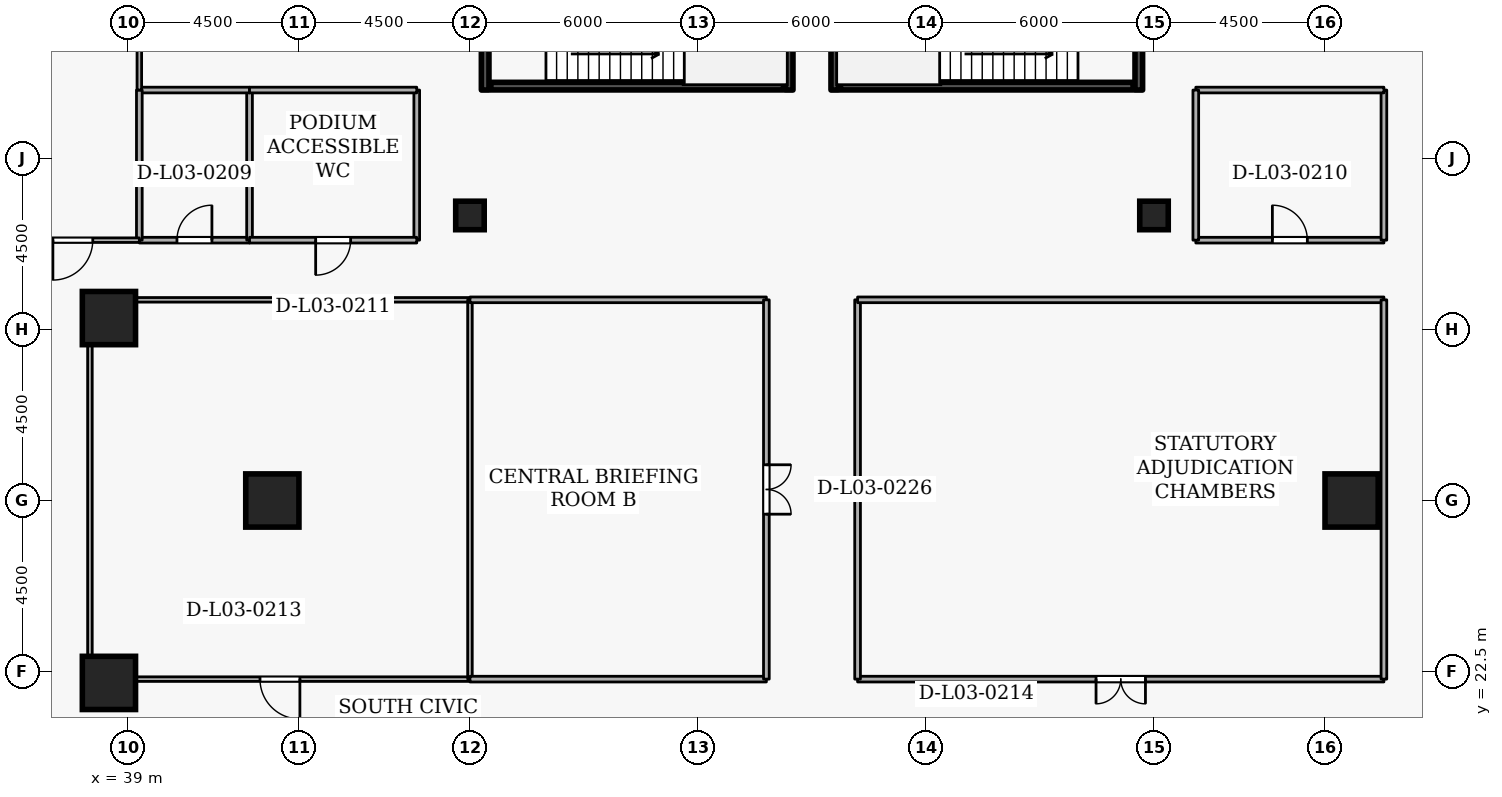
"""IFC4 building model, lengths in metres.
Left out: names, types, materials, properties, quantities, classifications, styles, units other than length and angle.
Written with IfcOpenShell. Run it as: python <this file> out.ifc"""

import sys

from ifc_helpers import new_model, si_unit, direction, frame, frame_2d, origin, origin_2d, place, context, subcontext, project, spatial, rectangle, extrude, element, fill, save


model = new_model("IFC4")
c1 = context("Model", 3, precision=1e-05, world=origin(), true_north=direction((0.0, 1.0)))
c2 = subcontext(c1, "Body", "Model", "MODEL_VIEW")
j1 = project(units=[si_unit("LENGTHUNIT", "METRE"), si_unit("PLANEANGLEUNIT", "RADIAN")], contexts=[c1])
p1 = place(None, origin())
s1 = spatial("IfcSite", under=j1, at=p1, CompositionType="ELEMENT")
p2 = place(p1, origin())
s2 = spatial("IfcBuilding", under=s1, at=p2, CompositionType="ELEMENT")
p3 = place(p2, frame((0.0, 0.0, 14.1)))
s3 = spatial("IfcBuildingStorey", under=s2, at=p3, CompositionType="ELEMENT", Elevation=14.1)
for number, where, z_axis, x_axis in (
    (1, (42.8, 27.0, 0.0), (0.0, 0.0, 1.0), (1.0, 0.0, 0.0)),
    (2, (38.5, 22.2, 0.0), (0.0, 0.0, 1.0), (1.0, 0.0, 0.0)),
    (3, (38.5, 31.8, 0.0), (0.0, 0.0, 1.0), (1.0, 0.0, 0.0)),
    (4, (71.2, 27.0, 0.0), (0.0, 0.0, 1.0), (1.0, 0.0, 0.0)),
):
    element("IfcColumn", number, at=place(p3, frame(where, z_axis=z_axis, x_axis=x_axis)), inside=s3, PredefinedType="COLUMN", context=c2, shape_type="SweptSolid", body=[
        extrude(rectangle(XDim=1.4, YDim=1.4, at=origin_2d()), origin(), (0.0, 0.0, 1.0), 4.5),
    ])
for number, where, z_axis, x_axis in (
    (5, (48.0, 34.5, 0.0), (0.0, 0.0, 1.0), (1.0, 0.0, 0.0)),
    (6, (66.0, 34.5, 0.0), (0.0, 0.0, 1.0), (1.0, 0.0, 0.0)),
):
    element("IfcColumn", number, at=place(p3, frame(where, z_axis=z_axis, x_axis=x_axis)), inside=s3, PredefinedType="COLUMN", context=c2, shape_type="SweptSolid", body=[
        extrude(rectangle(XDim=0.75, YDim=0.75, at=origin_2d()), origin(), (0.0, 0.0, 1.0), 4.5),
    ])
p4 = place(p3, frame((48.4, 37.8, 0.0), z_axis=(0.0, 0.0, 1.0), x_axis=(0.0, 1.0, 0.0)))
e7 = element("IfcWall", 7, at=p4, inside=s3, PredefinedType="SHEAR", context=c2, shape_type="SweptSolid", body=[
    extrude(rectangle(XDim=3.6, YDim=0.2, at=frame_2d((1.8, 0.0))), origin(), (0.0, 0.0, 1.0), 4.5),
])
p5 = place(p4, frame((1.25, 0.0, 0.0)))
e8 = element("IfcOpeningElement", 8, at=p5, cuts=e7, PredefinedType="OPENING", context=c2, shape_type="SweptSolid", body=[
    extrude(rectangle(XDim=1.1, YDim=2.1, at=frame_2d((0.55, 1.05))), frame((0.0, 0.11, 0.0), z_axis=(0.0, -1.0, 0.0), x_axis=(1.0, 0.0, 0.0)), (0.0, 0.0, 1.0), 0.22),
])
p6 = place(p3, frame((56.4, 41.4, 0.0), z_axis=(0.0, 0.0, 1.0), x_axis=(0.0, -1.0, 0.0)))
e9 = element("IfcWall", 9, at=p6, inside=s3, PredefinedType="SHEAR", context=c2, shape_type="SweptSolid", body=[
    extrude(rectangle(XDim=3.6, YDim=0.2, at=frame_2d((1.8, 0.0))), origin(), (0.0, 0.0, 1.0), 4.5),
])
p7 = place(p3, frame((48.55, 37.903, 0.0), z_axis=(0.0, 0.0, 1.0), x_axis=(1.0, 0.0, 0.0)))
e10 = element("IfcWall", 10, at=p7, inside=s3, PredefinedType="SHEAR", context=c2, shape_type="SweptSolid", body=[
    extrude(rectangle(XDim=7.7, YDim=0.2, at=frame_2d((3.85, 0.0))), origin(), (0.0, 0.0, 1.0), 4.5),
])
p8 = place(p3, frame((65.6, 41.4, 0.0), z_axis=(0.0, 0.0, 1.0), x_axis=(0.0, -1.0, 0.0)))
e11 = element("IfcWall", 11, at=p8, inside=s3, PredefinedType="SHEAR", context=c2, shape_type="SweptSolid", body=[
    extrude(rectangle(XDim=3.6, YDim=0.2, at=frame_2d((1.8, 0.0))), origin(), (0.0, 0.0, 1.0), 4.5),
])
p9 = place(p8, frame((1.25, 0.0, 0.0)))
e12 = element("IfcOpeningElement", 12, at=p9, cuts=e11, PredefinedType="OPENING", context=c2, shape_type="SweptSolid", body=[
    extrude(rectangle(XDim=1.1, YDim=2.1, at=frame_2d((0.55, 1.05))), frame((0.0, 0.11, 0.0), z_axis=(0.0, -1.0, 0.0), x_axis=(1.0, 0.0, 0.0)), (0.0, 0.0, 1.0), 0.22),
])
p10 = place(p3, frame((57.6, 37.8, 0.0), z_axis=(0.0, 0.0, 1.0), x_axis=(0.0, 1.0, 0.0)))
e13 = element("IfcWall", 13, at=p10, inside=s3, PredefinedType="SHEAR", context=c2, shape_type="SweptSolid", body=[
    extrude(rectangle(XDim=3.6, YDim=0.2, at=frame_2d((1.8, 0.0))), origin(), (0.0, 0.0, 1.0), 4.5),
])
p11 = place(p3, frame((57.75, 37.903, 0.0), z_axis=(0.0, 0.0, 1.0), x_axis=(1.0, 0.0, 0.0)))
e14 = element("IfcWall", 14, at=p11, inside=s3, PredefinedType="SHEAR", context=c2, shape_type="SweptSolid", body=[
    extrude(rectangle(XDim=7.7, YDim=0.2, at=frame_2d((3.85, 0.0))), origin(), (0.0, 0.0, 1.0), 4.5),
])
p12 = place(p3, frame((39.3, 33.85, 0.0), z_axis=(0.0, 0.0, 1.0), x_axis=(1.0, 0.0, 0.0)))
e15 = element("IfcWall", 15, at=p12, inside=s3, PredefinedType="PARTITIONING", context=c2, shape_type="SweptSolid", body=[
    extrude(rectangle(XDim=2.9, YDim=0.15, at=frame_2d((1.45, 0.0))), origin(), (0.0, 0.0, 1.0), 4.16),
])
p13 = place(p12, frame((0.99, 0.0, 0.0)))
e16 = element("IfcOpeningElement", 16, at=p13, cuts=e15, PredefinedType="OPENING", context=c2, shape_type="SweptSolid", body=[
    extrude(rectangle(XDim=0.92, YDim=2.08, at=frame_2d((0.46, 1.04))), frame((0.0, 0.085, 0.0), z_axis=(0.0, -1.0, 0.0), x_axis=(1.0, 0.0, 0.0)), (0.0, 0.0, 1.0), 0.17),
])
p14 = place(p3, frame((42.2, 33.85, 0.0), z_axis=(0.0, 0.0, 1.0), x_axis=(0.0, 1.0, 0.0)))
e17 = element("IfcWall", 17, at=p14, inside=s3, PredefinedType="PARTITIONING", context=c2, shape_type="SweptSolid", body=[
    extrude(rectangle(XDim=3.95, YDim=0.15, at=frame_2d((1.975, 0.0))), origin(), (0.0, 0.0, 1.0), 4.16),
])
p15 = place(p3, frame((42.2, 37.8, 0.0), z_axis=(0.0, 0.0, 1.0), x_axis=(-1.0, 0.0, 0.0)))
e18 = element("IfcWall", 18, at=p15, inside=s3, PredefinedType="PARTITIONING", context=c2, shape_type="SweptSolid", body=[
    extrude(rectangle(XDim=2.9, YDim=0.15, at=frame_2d((1.45, 0.0))), origin(), (0.0, 0.0, 1.0), 4.16),
])
p16 = place(p3, frame((39.3, 37.8, 0.0), z_axis=(0.0, 0.0, 1.0), x_axis=(0.0, -1.0, 0.0)))
e19 = element("IfcWall", 19, at=p16, inside=s3, PredefinedType="PARTITIONING", context=c2, shape_type="SweptSolid", body=[
    extrude(rectangle(XDim=3.95, YDim=0.15, at=frame_2d((1.975, 0.0))), origin(), (0.0, 0.0, 1.0), 4.16),
])
p17 = place(p3, frame((67.1, 33.85, 0.0), z_axis=(0.0, 0.0, 1.0), x_axis=(1.0, 0.0, 0.0)))
e20 = element("IfcWall", 20, at=p17, inside=s3, PredefinedType="PARTITIONING", context=c2, shape_type="SweptSolid", body=[
    extrude(rectangle(XDim=4.95, YDim=0.15, at=frame_2d((2.475, 0.0))), origin(), (0.0, 0.0, 1.0), 4.16),
])
p18 = place(p17, frame((2.015, 0.0, 0.0)))
e21 = element("IfcOpeningElement", 21, at=p18, cuts=e20, PredefinedType="OPENING", context=c2, shape_type="SweptSolid", body=[
    extrude(rectangle(XDim=0.92, YDim=2.08, at=frame_2d((0.46, 1.04))), frame((0.0, 0.085, 0.0), z_axis=(0.0, -1.0, 0.0), x_axis=(1.0, 0.0, 0.0)), (0.0, 0.0, 1.0), 0.17),
])
p19 = place(p3, frame((72.05, 33.85, 0.0), z_axis=(0.0, 0.0, 1.0), x_axis=(0.0, 1.0, 0.0)))
e22 = element("IfcWall", 22, at=p19, inside=s3, PredefinedType="PARTITIONING", context=c2, shape_type="SweptSolid", body=[
    extrude(rectangle(XDim=3.95, YDim=0.15, at=frame_2d((1.975, 0.0))), origin(), (0.0, 0.0, 1.0), 4.16),
])
p20 = place(p3, frame((72.05, 37.8, 0.0), z_axis=(0.0, 0.0, 1.0), x_axis=(-1.0, 0.0, 0.0)))
e23 = element("IfcWall", 23, at=p20, inside=s3, PredefinedType="PARTITIONING", context=c2, shape_type="SweptSolid", body=[
    extrude(rectangle(XDim=4.95, YDim=0.15, at=frame_2d((2.475, 0.0))), origin(), (0.0, 0.0, 1.0), 4.16),
])
for number, where, z_axis, x_axis in (
    (24, (67.1, 37.8, 0.0), (0.0, 0.0, 1.0), (0.0, -1.0, 0.0)),
    (25, (46.6, 37.8, 0.0), (0.0, 0.0, 1.0), (0.0, -1.0, 0.0)),
):
    element("IfcWall", number, at=place(p3, frame(where, z_axis=z_axis, x_axis=x_axis)), inside=s3, PredefinedType="PARTITIONING", context=c2, shape_type="SweptSolid", body=[
        extrude(rectangle(XDim=3.95, YDim=0.15, at=frame_2d((1.975, 0.0))), origin(), (0.0, 0.0, 1.0), 4.16),
    ])
p21 = place(p3, frame((46.6, 33.85, 0.0), z_axis=(0.0, 0.0, 1.0), x_axis=(-1.0, 0.0, 0.0)))
e26 = element("IfcWall", 26, at=p21, inside=s3, PredefinedType="PARTITIONING", context=c2, shape_type="SweptSolid", body=[
    extrude(rectangle(XDim=4.4, YDim=0.15, at=frame_2d((2.2, 0.0))), origin(), (0.0, 0.0, 1.0), 4.16),
])
p22 = place(p21, frame((1.74, 0.0, 0.0)))
e27 = element("IfcOpeningElement", 27, at=p22, cuts=e26, PredefinedType="OPENING", context=c2, shape_type="SweptSolid", body=[
    extrude(rectangle(XDim=0.92, YDim=2.08, at=frame_2d((0.46, 1.04))), frame((0.0, 0.085, 0.0), z_axis=(0.0, -1.0, 0.0), x_axis=(1.0, 0.0, 0.0)), (0.0, 0.0, 1.0), 0.17),
])
p23 = place(p3, frame((42.2, 37.8, 0.0), z_axis=(0.0, 0.0, 1.0), x_axis=(1.0, 0.0, 0.0)))
e28 = element("IfcWall", 28, at=p23, inside=s3, PredefinedType="PARTITIONING", context=c2, shape_type="SweptSolid", body=[
    extrude(rectangle(XDim=4.4, YDim=0.15, at=frame_2d((2.2, 0.0))), origin(), (0.0, 0.0, 1.0), 4.16),
])
p24 = place(p3, frame((48.0, 22.3, 0.0), z_axis=(0.0, 0.0, 1.0), x_axis=(-1.0, 0.0, 0.0)))
e29 = element("IfcWall", 29, at=p24, inside=s3, PredefinedType="PARTITIONING", context=c2, shape_type="SweptSolid", body=[
    extrude(rectangle(XDim=10.0, YDim=0.12, at=frame_2d((5.0, 0.0))), origin(), (0.0, 0.0, 1.0), 4.16),
])
p25 = place(p24, frame((4.475, 0.0, 0.0)))
e30 = element("IfcOpeningElement", 30, at=p25, cuts=e29, PredefinedType="OPENING", context=c2, shape_type="SweptSolid", body=[
    extrude(rectangle(XDim=1.05, YDim=2.1, at=frame_2d((0.525, 1.05))), frame((0.0, 0.07, 0.0), z_axis=(0.0, -1.0, 0.0), x_axis=(1.0, 0.0, 0.0)), (0.0, 0.0, 1.0), 0.14),
])
p26 = place(p3, frame((38.0, 22.3, 0.0), z_axis=(0.0, 0.0, 1.0), x_axis=(0.0, 1.0, 0.0)))
e31 = element("IfcWall", 31, at=p26, inside=s3, PredefinedType="PARTITIONING", context=c2, shape_type="SweptSolid", body=[
    extrude(rectangle(XDim=9.98, YDim=0.12, at=frame_2d((4.99, 0.0))), origin(), (0.0, 0.0, 1.0), 4.16),
])
p27 = place(p3, frame((38.0, 32.28, 0.0), z_axis=(0.0, 0.0, 1.0), x_axis=(1.0, 0.0, 0.0)))
e32 = element("IfcWall", 32, at=p27, inside=s3, PredefinedType="PARTITIONING", context=c2, shape_type="SweptSolid", body=[
    extrude(rectangle(XDim=10.0, YDim=0.12, at=frame_2d((5.0, 0.0))), origin(), (0.0, 0.0, 1.0), 4.16),
])
p28 = place(p3, frame((48.0, 32.28, 0.0), z_axis=(0.0, 0.0, 1.0), x_axis=(0.0, -1.0, 0.0)))
e33 = element("IfcWall", 33, at=p28, inside=s3, PredefinedType="PARTITIONING", context=c2, shape_type="SweptSolid", body=[
    extrude(rectangle(XDim=9.98, YDim=0.12, at=frame_2d((4.99, 0.0))), origin(), (0.0, 0.0, 1.0), 3.314),
])
p29 = place(p3, frame((72.05, 22.3, 0.0), z_axis=(0.0, 0.0, 1.0), x_axis=(-1.0, 0.0, 0.0)))
e34 = element("IfcWall", 34, at=p29, inside=s3, PredefinedType="PARTITIONING", context=c2, shape_type="SweptSolid", body=[
    extrude(rectangle(XDim=13.85, YDim=0.15, at=frame_2d((6.925, 0.0))), origin(), (0.0, 0.0, 1.0), 4.16),
])
p30 = place(p29, frame((6.275, 0.0, 0.0)))
e35 = element("IfcOpeningElement", 35, at=p30, cuts=e34, PredefinedType="OPENING", context=c2, shape_type="SweptSolid", body=[
    extrude(rectangle(XDim=1.3, YDim=2.12, at=frame_2d((0.65, 1.06))), frame((0.0, 0.085, 0.0), z_axis=(0.0, -1.0, 0.0), x_axis=(1.0, 0.0, 0.0)), (0.0, 0.0, 1.0), 0.17),
])
p31 = place(p3, frame((58.2, 22.3, 0.0), z_axis=(0.0, 0.0, 1.0), x_axis=(0.0, 1.0, 0.0)))
e36 = element("IfcWall", 36, at=p31, inside=s3, PredefinedType="PARTITIONING", context=c2, shape_type="SweptSolid", body=[
    extrude(rectangle(XDim=9.98, YDim=0.15, at=frame_2d((4.99, 0.0))), origin(), (0.0, 0.0, 1.0), 4.16),
])
p32 = place(p3, frame((58.2, 32.28, 0.0), z_axis=(0.0, 0.0, 1.0), x_axis=(1.0, 0.0, 0.0)))
e37 = element("IfcWall", 37, at=p32, inside=s3, PredefinedType="PARTITIONING", context=c2, shape_type="SweptSolid", body=[
    extrude(rectangle(XDim=13.85, YDim=0.15, at=frame_2d((6.925, 0.0))), origin(), (0.0, 0.0, 1.0), 4.16),
])
p33 = place(p3, frame((72.05, 32.28, 0.0), z_axis=(0.0, 0.0, 1.0), x_axis=(0.0, -1.0, 0.0)))
e38 = element("IfcWall", 38, at=p33, inside=s3, PredefinedType="PARTITIONING", context=c2, shape_type="SweptSolid", body=[
    extrude(rectangle(XDim=9.98, YDim=0.15, at=frame_2d((4.99, 0.0))), origin(), (0.0, 0.0, 1.0), 4.16),
])
p34 = place(p3, frame((39.3, 49.18, 0.0), z_axis=(0.0, 0.0, 1.0), x_axis=(0.0, -1.0, 0.0)))
e39 = element("IfcWall", 39, at=p34, inside=s3, PredefinedType="PARTITIONING", context=c2, shape_type="SweptSolid", body=[
    extrude(rectangle(XDim=11.38, YDim=0.12, at=frame_2d((5.69, 0.0))), origin(), (0.0, 0.0, 1.0), 4.16),
])
p35 = place(p3, frame((39.3, 33.85, 0.0), z_axis=(0.0, 0.0, 1.0), x_axis=(-1.0, 0.0, 0.0)))
e40 = element("IfcWall", 40, at=p35, inside=s3, PredefinedType="PARTITIONING", context=c2, shape_type="SweptSolid", body=[
    extrude(rectangle(XDim=3.5, YDim=0.12, at=frame_2d((1.75, 0.0))), origin(), (0.0, 0.0, 1.0), 4.16),
])
p36 = place(p35, frame((1.225, 0.0, 0.0)))
e41 = element("IfcOpeningElement", 41, at=p36, cuts=e40, PredefinedType="OPENING", context=c2, shape_type="SweptSolid", body=[
    extrude(rectangle(XDim=1.05, YDim=2.1, at=frame_2d((0.525, 1.05))), frame((0.0, 0.07, 0.0), z_axis=(0.0, -1.0, 0.0), x_axis=(1.0, 0.0, 0.0)), (0.0, 0.0, 1.0), 0.14),
])
for number, where, z_axis, x_axis in (
    (42, (55.8, 22.3, 0.0), (0.0, 0.0, 1.0), (-1.0, 0.0, 0.0)),
    (43, (48.0, 32.28, 0.0), (0.0, 0.0, 1.0), (1.0, 0.0, 0.0)),
):
    element("IfcWall", number, at=place(p3, frame(where, z_axis=z_axis, x_axis=x_axis)), inside=s3, PredefinedType="PARTITIONING", context=c2, shape_type="SweptSolid", body=[
        extrude(rectangle(XDim=7.8, YDim=0.15, at=frame_2d((3.9, 0.0))), origin(), (0.0, 0.0, 1.0), 4.16),
    ])
p37 = place(p3, frame((55.8, 32.28, 0.0), z_axis=(0.0, 0.0, 1.0), x_axis=(0.0, -1.0, 0.0)))
e44 = element("IfcWall", 44, at=p37, inside=s3, PredefinedType="PARTITIONING", context=c2, shape_type="SweptSolid", body=[
    extrude(rectangle(XDim=9.98, YDim=0.15, at=frame_2d((4.99, 0.0))), origin(), (0.0, 0.0, 1.0), 4.16),
])
p38 = place(p37, frame((4.34, 0.0, 0.0)))
e45 = element("IfcOpeningElement", 45, at=p38, cuts=e44, PredefinedType="OPENING", context=c2, shape_type="SweptSolid", body=[
    extrude(rectangle(XDim=1.3, YDim=2.12, at=frame_2d((0.65, 1.06))), frame((0.0, 0.085, 0.0), z_axis=(0.0, -1.0, 0.0), x_axis=(1.0, 0.0, 0.0)), (0.0, 0.0, 1.0), 0.17),
])
p39 = place(p13, origin())
e46 = element("IfcDoor", 46, at=p39, inside=s3, OperationType="SINGLE_SWING_RIGHT", PredefinedType="DOOR", context=c2, shape_type="SweptSolid", body=[
    extrude(rectangle(XDim=0.92, YDim=2.08, at=frame_2d((0.46, 1.04))), frame((0.0, 0.025, 0.0), z_axis=(0.0, -1.0, 0.0), x_axis=(1.0, 0.0, 0.0)), (0.0, 0.0, 1.0), 0.05),
])
fill(e16, e46)
p40 = place(p18, origin())
e47 = element("IfcDoor", 47, at=p40, inside=s3, OperationType="SINGLE_SWING_LEFT", PredefinedType="DOOR", context=c2, shape_type="SweptSolid", body=[
    extrude(rectangle(XDim=0.92, YDim=2.08, at=frame_2d((0.46, 1.04))), frame((0.0, 0.025, 0.0), z_axis=(0.0, -1.0, 0.0), x_axis=(1.0, 0.0, 0.0)), (0.0, 0.0, 1.0), 0.05),
])
fill(e21, e47)
p41 = place(p22, origin())
e48 = element("IfcDoor", 48, at=p41, inside=s3, OperationType="SINGLE_SWING_RIGHT", PredefinedType="DOOR", context=c2, shape_type="SweptSolid", body=[
    extrude(rectangle(XDim=0.92, YDim=2.08, at=frame_2d((0.46, 1.04))), frame((0.0, 0.025, 0.0), z_axis=(0.0, -1.0, 0.0), x_axis=(1.0, 0.0, 0.0)), (0.0, 0.0, 1.0), 0.05),
])
fill(e27, e48)
p42 = place(p25, origin())
e49 = element("IfcDoor", 49, at=p42, inside=s3, OperationType="SINGLE_SWING_LEFT", PredefinedType="DOOR", context=c2, shape_type="SweptSolid", body=[
    extrude(rectangle(XDim=1.05, YDim=2.1, at=frame_2d((0.525, 1.05))), frame((0.0, 0.025, 0.0), z_axis=(0.0, -1.0, 0.0), x_axis=(1.0, 0.0, 0.0)), (0.0, 0.0, 1.0), 0.05),
])
fill(e30, e49)
p43 = place(p30, origin())
e50 = element("IfcDoor", 50, at=p43, inside=s3, OperationType="DOUBLE_DOOR_SINGLE_SWING", PredefinedType="DOOR", context=c2, shape_type="SweptSolid", body=[
    extrude(rectangle(XDim=1.3, YDim=2.12, at=frame_2d((0.65, 1.06))), frame((0.0, 0.025, 0.0), z_axis=(0.0, -1.0, 0.0), x_axis=(1.0, 0.0, 0.0)), (0.0, 0.0, 1.0), 0.05),
])
fill(e35, e50)
p44 = place(p36, origin())
e51 = element("IfcDoor", 51, at=p44, inside=s3, OperationType="SINGLE_SWING_RIGHT", PredefinedType="DOOR", context=c2, shape_type="SweptSolid", body=[
    extrude(rectangle(XDim=1.05, YDim=2.1, at=frame_2d((0.525, 1.05))), frame((0.0, 0.025, 0.0), z_axis=(0.0, -1.0, 0.0), x_axis=(1.0, 0.0, 0.0)), (0.0, 0.0, 1.0), 0.05),
])
fill(e41, e51)
p45 = place(p38, origin())
e52 = element("IfcDoor", 52, at=p45, inside=s3, OperationType="DOUBLE_DOOR_SINGLE_SWING", PredefinedType="DOOR", context=c2, shape_type="SweptSolid", body=[
    extrude(rectangle(XDim=1.3, YDim=2.12, at=frame_2d((0.65, 1.06))), frame((0.0, 0.025, 0.0), z_axis=(0.0, -1.0, 0.0), x_axis=(1.0, 0.0, 0.0)), (0.0, 0.0, 1.0), 0.05),
])
fill(e45, e52)
save(model, sys.argv[1])
